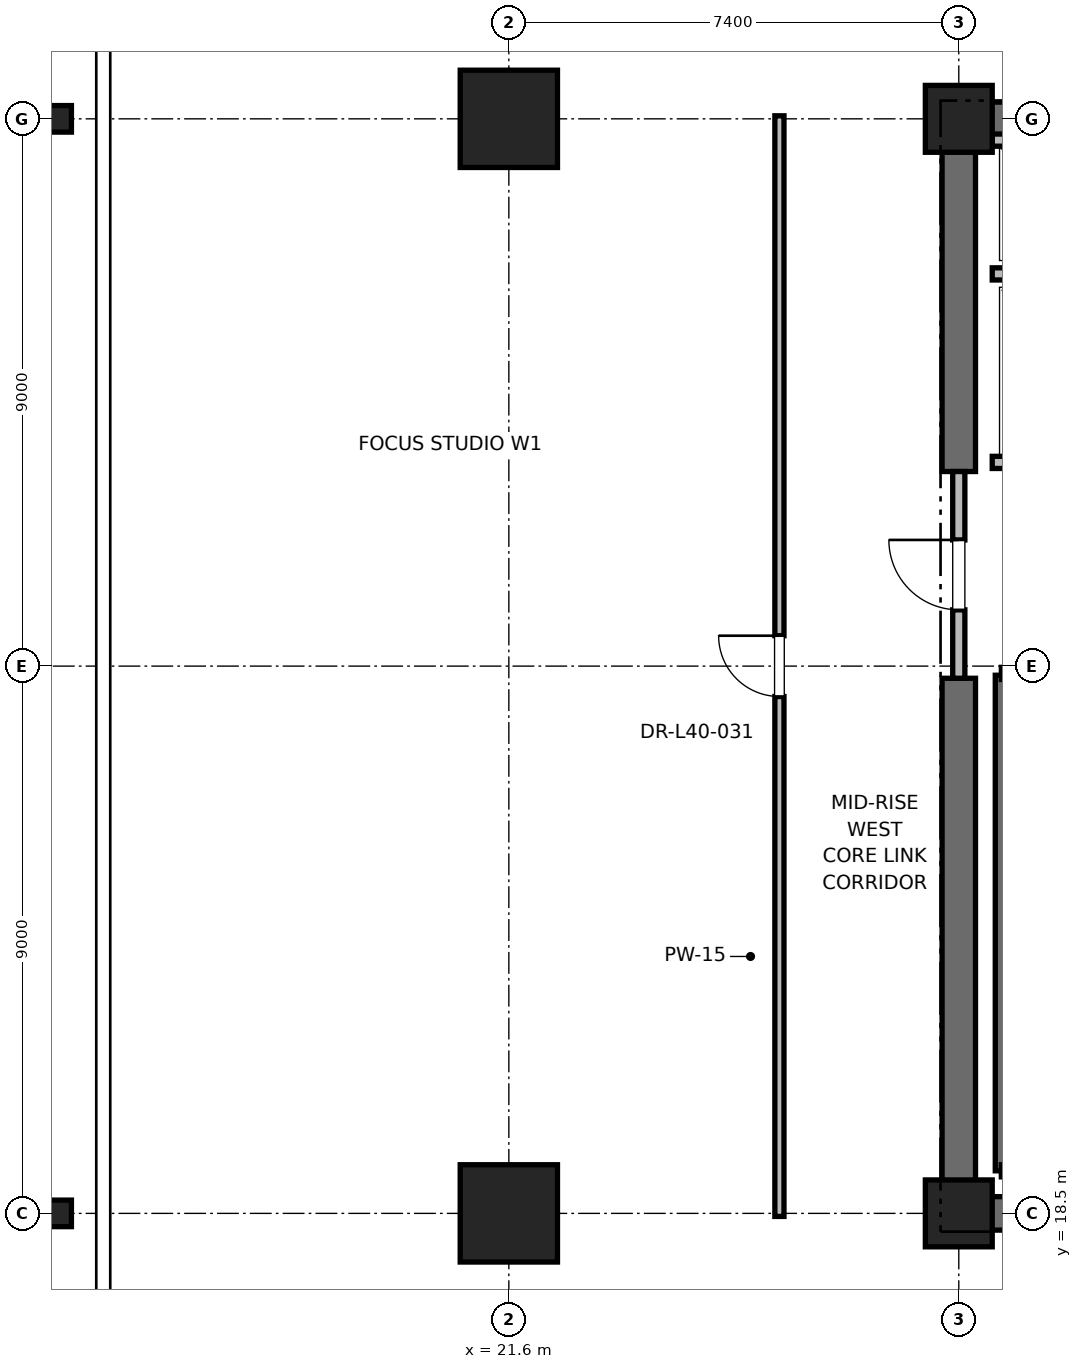
"""IFC4 building model, lengths in metres.
Left out: names, types, materials, properties, quantities, classifications, styles, units other than length and angle.
Written with IfcOpenShell. Run it as: python <this file> out.ifc"""

import sys

from ifc_helpers import new_model, si_unit, direction, frame, frame_2d, origin, origin_2d, place, context, subcontext, project, spatial, rectangle, i_section, extrude, element, fill, save


model = new_model("IFC4")
c1 = context("Model", 3, precision=1e-05, world=origin(), true_north=direction((0.0, 1.0)))
c2 = subcontext(c1, "Body", "Model", "MODEL_VIEW")
j1 = project(units=[si_unit("LENGTHUNIT", "METRE"), si_unit("PLANEANGLEUNIT", "RADIAN")], contexts=[c1])
p1 = place(None, origin())
s1 = spatial("IfcSite", under=j1, at=p1, CompositionType="ELEMENT")
p2 = place(p1, origin())
s2 = spatial("IfcBuilding", under=s1, at=p2, CompositionType="ELEMENT")
p3 = place(p2, frame((0.0, 0.0, 172.4)))
s3 = spatial("IfcBuildingStorey", under=s2, at=p3, CompositionType="ELEMENT", Elevation=172.4)
for number, where, z_axis, x_axis in (
    (1, (21.6, 18.5, 0.0), (0.0, 0.0, 1.0), (1.0, 0.0, 0.0)),
    (2, (21.6, 36.5, 0.0), (0.0, 0.0, 1.0), (1.0, 0.0, 0.0)),
):
    element("IfcColumn", number, at=place(p3, frame(where, z_axis=z_axis, x_axis=x_axis)), inside=s3, PredefinedType="COLUMN", context=c2, shape_type="SweptSolid", body=[
        extrude(rectangle(XDim=1.6, YDim=1.6, at=origin_2d()), origin(), (0.0, 0.0, 1.0), 4.0),
    ])
for number, where, z_axis, x_axis in (
    (3, (14.2, 18.5, 0.0), (0.0, 0.0, 1.0), (1.0, 0.0, 0.0)),
    (4, (14.2, 36.5, 0.0), (0.0, 0.0, 1.0), (1.0, 0.0, 0.0)),
):
    element("IfcColumn", number, at=place(p3, frame(where, z_axis=z_axis, x_axis=x_axis)), inside=s3, PredefinedType="COLUMN", context=c2, shape_type="SweptSolid", body=[
        extrude(i_section(OverallWidth=0.412, OverallDepth=0.437, WebThickness=0.036, FlangeThickness=0.058, FilletRadius=0.015, at=origin_2d()), origin(), (0.0, 0.0, 1.0), 4.0),
    ])
for number, where, z_axis, x_axis in (
    (5, (29.0, 18.5, 0.0), (0.0, 0.0, 1.0), (1.0, 0.0, 0.0)),
    (6, (29.0, 36.5, 0.0), (0.0, 0.0, 1.0), (1.0, 0.0, 0.0)),
):
    element("IfcColumn", number, at=place(p3, frame(where, z_axis=z_axis, x_axis=x_axis)), inside=s3, PredefinedType="PILASTER", context=c2, shape_type="SweptSolid", body=[
        extrude(rectangle(XDim=1.1, YDim=1.1, at=origin_2d()), origin(), (0.0, 0.0, 1.0), 4.0),
    ])
p4 = place(p3, frame((29.0, 18.5, 0.0), z_axis=(0.0, 0.0, 1.0), x_axis=(1.0, 0.0, 0.0)))
e7 = element("IfcWall", 7, at=p4, inside=s3, PredefinedType="SHEAR", context=c2, shape_type="SweptSolid", body=[
    extrude(rectangle(XDim=9.2, YDim=0.55, at=frame_2d((4.6, 0.0))), origin(), (0.0, 0.0, 1.0), 3.775),
])
p5 = place(p3, frame((29.0, 36.5, 0.0), z_axis=(0.0, 0.0, 1.0), x_axis=(1.0, 0.0, 0.0)))
e8 = element("IfcWall", 8, at=p5, inside=s3, PredefinedType="SHEAR", context=c2, shape_type="SweptSolid", body=[
    extrude(rectangle(XDim=5.8, YDim=0.55, at=frame_2d((2.9, 0.0))), origin(), (0.0, 0.0, 1.0), 3.775),
])
p6 = place(p3, frame((29.0, 18.5, 0.0), z_axis=(0.0, 0.0, 1.0), x_axis=(0.0, 1.0, 0.0)))
e9 = element("IfcWall", 9, at=p6, inside=s3, PredefinedType="SHEAR", context=c2, shape_type="SweptSolid", body=[
    extrude(rectangle(XDim=8.8, YDim=0.55, at=frame_2d((4.4, 0.0))), origin(), (0.0, 0.0, 1.0), 3.775),
])
p7 = place(p3, frame((29.0, 30.7, 0.0), z_axis=(0.0, 0.0, 1.0), x_axis=(0.0, 1.0, 0.0)))
e10 = element("IfcWall", 10, at=p7, inside=s3, PredefinedType="SHEAR", context=c2, shape_type="SweptSolid", body=[
    extrude(rectangle(XDim=5.8, YDim=0.55, at=frame_2d((2.9, 0.0))), origin(), (0.0, 0.0, 1.0), 3.775),
])
p8 = place(p3, frame((29.7, 19.2, 0.0), z_axis=(0.0, 0.0, 1.0), x_axis=(0.0, 1.0, 0.0)))
e11 = element("IfcWall", 11, at=p8, inside=s3, PredefinedType="SOLIDWALL", context=c2, shape_type="SweptSolid", body=[
    extrude(rectangle(XDim=8.15, YDim=0.2, at=frame_2d((4.075, 0.0))), origin(), (0.0, 0.0, 1.0), 3.775),
])
p9 = place(p3, frame((29.0, 27.3, 0.0), z_axis=(0.0, 0.0, 1.0), x_axis=(0.0, 1.0, 0.0)))
e12 = element("IfcWall", 12, at=p9, inside=s3, PredefinedType="PARTITIONING", context=c2, shape_type="SweptSolid", body=[
    extrude(rectangle(XDim=3.4, YDim=0.2, at=frame_2d((1.7, 0.0))), origin(), (0.0, 0.0, 1.0), 2.755),
])
p10 = place(p9, frame((1.125, 0.0, 0.0)))
e13 = element("IfcOpeningElement", 13, at=p10, cuts=e12, PredefinedType="OPENING", context=c2, shape_type="SweptSolid", body=[
    extrude(rectangle(XDim=1.15, YDim=2.2, at=frame_2d((0.575, 1.1))), frame((0.0, 0.1, 0.0), z_axis=(0.0, -1.0, 0.0), x_axis=(1.0, 0.0, 0.0)), (0.0, 0.0, 1.0), 0.2),
])
p11 = place(p3, frame((29.55, 30.85, 0.0), z_axis=(0.0, 0.0, 1.0), x_axis=(1.0, 0.0, 0.0)))
e14 = element("IfcWall", 14, at=p11, inside=s3, PredefinedType="SOLIDWALL", context=c2, shape_type="SweptSolid", body=[
    extrude(rectangle(XDim=2.6, YDim=0.2, at=frame_2d((1.3, 0.0))), origin(), (0.0, 0.0, 1.0), 2.755),
])
p12 = place(p11, frame((0.75, 0.0, 0.0)))
e15 = element("IfcOpeningElement", 15, at=p12, cuts=e14, PredefinedType="OPENING", context=c2, shape_type="SweptSolid", body=[
    extrude(rectangle(XDim=1.1, YDim=2.2, at=frame_2d((0.55, 1.1))), frame((0.0, 0.1, 0.0), z_axis=(0.0, -1.0, 0.0), x_axis=(1.0, 0.0, 0.0)), (0.0, 0.0, 1.0), 0.2),
])
p13 = place(p3, frame((29.55, 33.95, 0.0), z_axis=(0.0, 0.0, 1.0), x_axis=(1.0, 0.0, 0.0)))
e16 = element("IfcWall", 16, at=p13, inside=s3, PredefinedType="SOLIDWALL", context=c2, shape_type="SweptSolid", body=[
    extrude(rectangle(XDim=2.8, YDim=0.2, at=frame_2d((1.4, 0.0))), origin(), (0.0, 0.0, 1.0), 3.775),
])
p14 = place(p3, frame((32.35, 36.15, 0.0), z_axis=(0.0, 0.0, 1.0), x_axis=(-1.0, 0.0, 0.0)))
e17 = element("IfcWall", 17, at=p14, inside=s3, PredefinedType="SOLIDWALL", context=c2, shape_type="SweptSolid", body=[
    extrude(rectangle(XDim=2.8, YDim=0.2, at=frame_2d((1.4, 0.0))), origin(), (0.0, 0.0, 1.0), 2.985),
])
p15 = place(p3, frame((26.05, 18.45, 0.0), z_axis=(0.0, 0.0, 1.0), x_axis=(0.0, 1.0, 0.0)))
e18 = element("IfcWall", 18, at=p15, inside=s3, PredefinedType="PARTITIONING", context=c2, shape_type="SweptSolid", body=[
    extrude(rectangle(XDim=18.1, YDim=0.15, at=frame_2d((9.05, 0.0))), origin(), (0.0, 0.0, 1.0), 2.85),
])
p16 = place(p15, frame((8.55, 0.0, 0.0)))
e19 = element("IfcOpeningElement", 19, at=p16, cuts=e18, PredefinedType="OPENING", context=c2, shape_type="SweptSolid", body=[
    extrude(rectangle(XDim=1.0, YDim=2.15, at=frame_2d((0.5, 1.075))), frame((0.0, 0.075, 0.0), z_axis=(0.0, -1.0, 0.0), x_axis=(1.0, 0.0, 0.0)), (0.0, 0.0, 1.0), 0.15),
])
p17 = place(p10, origin())
e20 = element("IfcDoor", 20, at=p17, inside=s3, OperationType="SINGLE_SWING_RIGHT", PredefinedType="DOOR", context=c2, shape_type="SweptSolid", body=[
    extrude(rectangle(XDim=1.15, YDim=2.2, at=frame_2d((0.575, 1.1))), frame((0.0, 0.025, 0.0), z_axis=(0.0, -1.0, 0.0), x_axis=(1.0, 0.0, 0.0)), (0.0, 0.0, 1.0), 0.05),
])
fill(e13, e20)
p18 = place(p16, origin())
e21 = element("IfcDoor", 21, at=p18, inside=s3, OperationType="SINGLE_SWING_RIGHT", PredefinedType="DOOR", context=c2, shape_type="SweptSolid", body=[
    extrude(rectangle(XDim=1.0, YDim=2.15, at=frame_2d((0.5, 1.075))), frame((0.0, 0.025, 0.0), z_axis=(0.0, -1.0, 0.0), x_axis=(1.0, 0.0, 0.0)), (0.0, 0.0, 1.0), 0.05),
])
fill(e19, e21)
save(model, sys.argv[1])
